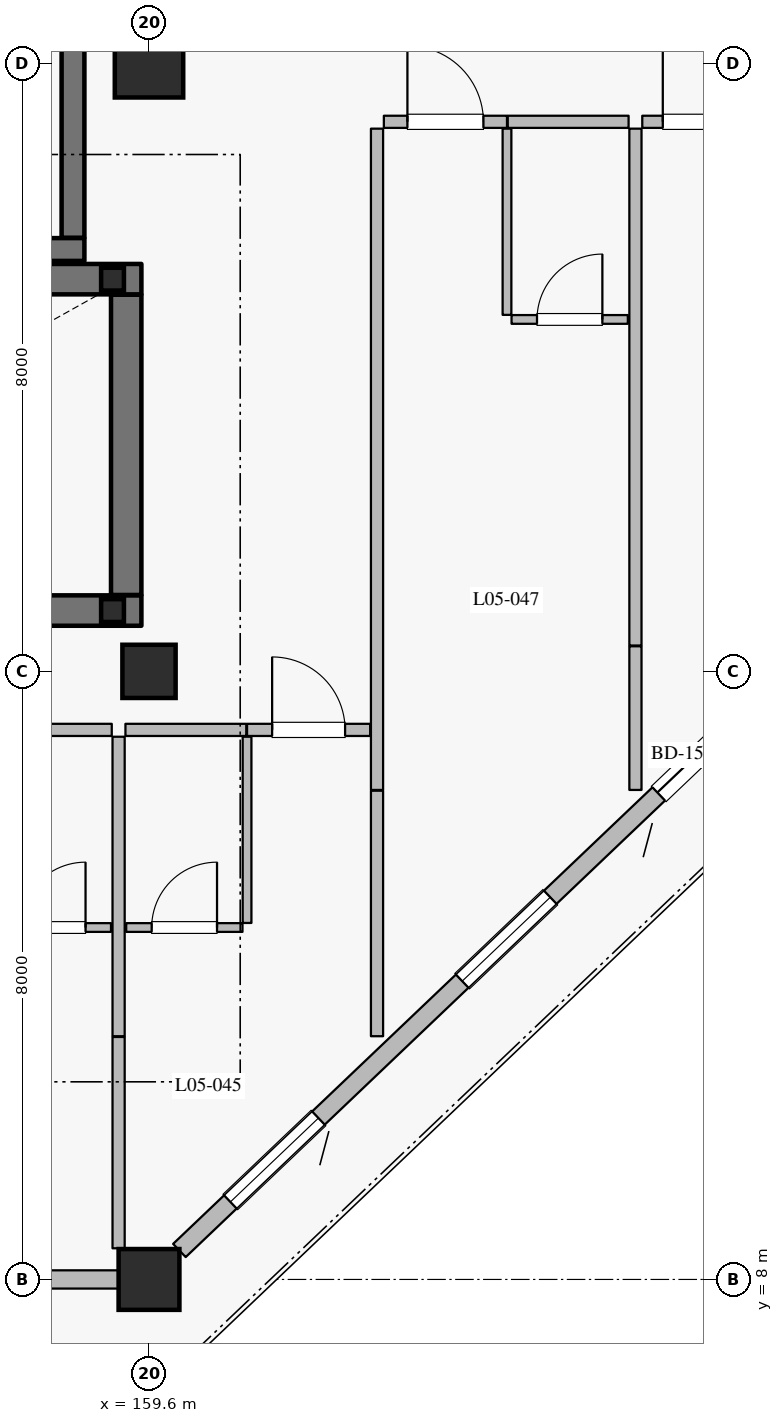
"""IFC4 building model, lengths in metres.
Left out: names, types, materials, properties, quantities, classifications, styles, units other than length and angle.
Written with IfcOpenShell. Run it as: python <this file> out.ifc"""

import sys

from ifc_helpers import new_model, si_unit, direction, frame, frame_2d, origin, origin_2d, place, context, subcontext, project, spatial, rectangle, hollow_rectangle, extrude, element, fill, save


model = new_model("IFC4")
c1 = context("Model", 3, precision=1e-05, world=origin(), true_north=direction((0.0, 1.0)))
c2 = subcontext(c1, "Body", "Model", "MODEL_VIEW")
j1 = project(units=[si_unit("LENGTHUNIT", "METRE"), si_unit("PLANEANGLEUNIT", "RADIAN")], contexts=[c1])
p1 = place(None, origin())
s1 = spatial("IfcSite", under=j1, at=p1, CompositionType="ELEMENT")
p2 = place(p1, origin())
s2 = spatial("IfcBuilding", under=s1, at=p2, CompositionType="ELEMENT")
p3 = place(p2, frame((0.0, 0.0, 25.2)))
s3 = spatial("IfcBuildingStorey", under=s2, at=p3, CompositionType="ELEMENT", Elevation=25.2)
p4 = place(p3, frame((159.6, 8.0, 0.0), z_axis=(0.0, 0.0, 1.0), x_axis=(1.0, 0.0, 0.0)))
e1 = element("IfcColumn", 1, at=p4, inside=s3, PredefinedType="COLUMN", context=c2, shape_type="SweptSolid", body=[
    extrude(rectangle(XDim=0.8, YDim=0.8, at=origin_2d()), origin(), (0.0, 0.0, 1.0), 3.6),
])
p5 = place(p3, frame((159.6, 24.0, 0.0), z_axis=(0.0, 0.0, 1.0), x_axis=(1.0, 0.0, 0.0)))
e2 = element("IfcColumn", 2, at=p5, inside=s3, PredefinedType="COLUMN", context=c2, shape_type="SweptSolid", body=[
    extrude(rectangle(XDim=0.9, YDim=0.9, at=origin_2d()), origin(), (0.0, 0.0, 1.0), 3.6),
])
p6 = place(p3, frame((159.6, 16.0, 0.0), z_axis=(0.0, 0.0, 1.0), x_axis=(1.0, 0.0, 0.0)))
e3 = element("IfcColumn", 3, at=p6, inside=s3, PredefinedType="COLUMN", context=c2, shape_type="SweptSolid", body=[
    extrude(rectangle(XDim=0.7, YDim=0.7, at=origin_2d()), origin(), (0.0, 0.0, 1.0), 3.6),
])
p7 = place(p3, frame((159.2, 8.0, 0.0), z_axis=(0.0, 0.0, 1.0), x_axis=(-1.0, 0.0, 0.0)))
e4 = element("IfcWall", 4, at=p7, inside=s3, PredefinedType="SOLIDWALL", context=c2, shape_type="SweptSolid", body=[
    extrude(rectangle(XDim=7.6, YDim=0.24, at=frame_2d((3.8, 0.0))), origin(), (0.0, 0.0, 1.0), 2.93),
])
p8 = place(p7, frame((0.95, 0.0, 0.0)))
e5 = element("IfcOpeningElement", 5, at=p8, cuts=e4, PredefinedType="OPENING", context=c2, shape_type="SweptSolid", body=[
    extrude(rectangle(XDim=1.5, YDim=2.25, at=frame_2d((0.75, 1.125))), frame((0.0, 0.13, 0.0), z_axis=(0.0, -1.0, 0.0), x_axis=(1.0, 0.0, 0.0)), (0.0, 0.0, 1.0), 0.26),
])
p9 = place(p7, frame((4.3, 0.0, 0.8)))
e6 = element("IfcOpeningElement", 6, at=p9, cuts=e4, PredefinedType="OPENING", context=c2, shape_type="SweptSolid", body=[
    extrude(rectangle(XDim=1.6, YDim=1.6, at=frame_2d((0.8, 0.8))), frame((0.0, 0.13, 0.0), z_axis=(0.0, -1.0, 0.0), x_axis=(1.0, 0.0, 0.0)), (0.0, 0.0, 1.0), 0.26),
])
p10 = place(p3, frame((167.6, 15.619, 0.0), z_axis=(0.0, 0.0, 1.0), x_axis=(-0.724156739794, -0.689635422677, 0.0)))
e7 = element("IfcWall", 7, at=p10, inside=s3, PredefinedType="SOLIDWALL", context=c2, shape_type="SweptSolid", body=[
    extrude(rectangle(XDim=10.495, YDim=0.24, at=frame_2d((5.248, 0.0))), origin(), (0.0, 0.0, 1.0), 2.93),
])
p11 = place(p10, frame((0.286, 0.0, 0.0)))
e8 = element("IfcOpeningElement", 8, at=p11, cuts=e7, PredefinedType="OPENING", context=c2, shape_type="SweptSolid", body=[
    extrude(rectangle(XDim=1.5, YDim=2.25, at=frame_2d((0.75, 1.125))), frame((0.0, 0.13, 0.0), z_axis=(0.0, -1.0, 0.0), x_axis=(1.0, 0.0, 0.0)), (0.0, 0.0, 1.0), 0.26),
])
p12 = place(p10, frame((3.757, 0.0, 0.8)))
e9 = element("IfcOpeningElement", 9, at=p12, cuts=e7, PredefinedType="OPENING", context=c2, shape_type="SweptSolid", body=[
    extrude(rectangle(XDim=1.6, YDim=1.6, at=frame_2d((0.8, 0.8))), frame((0.0, 0.13, 0.0), z_axis=(0.0, -1.0, 0.0), x_axis=(1.0, 0.0, 0.0)), (0.0, 0.0, 1.0), 0.26),
])
p13 = place(p10, frame((7.969, 0.0, 0.8)))
e10 = element("IfcOpeningElement", 10, at=p13, cuts=e7, PredefinedType="OPENING", context=c2, shape_type="SweptSolid", body=[
    extrude(rectangle(XDim=1.6, YDim=1.6, at=frame_2d((0.8, 0.8))), frame((0.0, 0.13, 0.0), z_axis=(0.0, -1.0, 0.0), x_axis=(1.0, 0.0, 0.0)), (0.0, 0.0, 1.0), 0.26),
])
p14 = place(p3, frame((155.25, 21.55, 0.0), z_axis=(0.0, 0.0, 1.0), x_axis=(1.0, 0.0, 0.0)))
e11 = element("IfcWall", 11, at=p14, inside=s3, PredefinedType="SHEAR", context=c2, shape_type="SweptSolid", body=[
    extrude(rectangle(XDim=3.5, YDim=0.3, at=frame_2d((1.75, 0.0))), origin(), (0.0, 0.0, 1.0), 3.335),
])
p15 = place(p3, frame((158.6, 21.705, 0.0), z_axis=(0.0, 0.0, 1.0), x_axis=(0.0, 1.0, 0.0)))
e12 = element("IfcWall", 12, at=p15, inside=s3, PredefinedType="SHEAR", context=c2, shape_type="SweptSolid", body=[
    extrude(rectangle(XDim=2.59, YDim=0.3, at=frame_2d((1.295, 0.0))), origin(), (0.0, 0.0, 1.0), 3.335),
])
p16 = place(p3, frame((151.3, 16.8, 0.0), z_axis=(0.0, 0.0, 1.0), x_axis=(1.0, 0.0, 0.0)))
e13 = element("IfcWall", 13, at=p16, inside=s3, PredefinedType="SHEAR", context=c2, shape_type="SweptSolid", body=[
    extrude(rectangle(XDim=8.2, YDim=0.4, at=frame_2d((4.1, 0.0))), origin(), (0.0, 0.0, 1.0), 3.335),
])
p17 = place(p3, frame((159.3, 17.005, 0.0), z_axis=(0.0, 0.0, 1.0), x_axis=(0.0, 1.0, 0.0)))
e14 = element("IfcWall", 14, at=p17, inside=s3, PredefinedType="SHEAR", context=c2, shape_type="SweptSolid", body=[
    extrude(rectangle(XDim=3.95, YDim=0.4, at=frame_2d((1.975, 0.0))), origin(), (0.0, 0.0, 1.0), 3.335),
])
p18 = place(p3, frame((151.3, 21.16, 0.0), z_axis=(0.0, 0.0, 1.0), x_axis=(1.0, 0.0, 0.0)))
e15 = element("IfcWall", 15, at=p18, inside=s3, PredefinedType="SHEAR", context=c2, shape_type="SweptSolid", body=[
    extrude(rectangle(XDim=8.2, YDim=0.4, at=frame_2d((4.1, 0.0))), origin(), (0.0, 0.0, 1.0), 3.335),
])
p19 = place(p18, frame((0.43, 0.0, 0.0)))
e16 = element("IfcOpeningElement", 16, at=p19, cuts=e15, PredefinedType="OPENING", context=c2, shape_type="SweptSolid", body=[
    extrude(rectangle(XDim=1.16, YDim=2.2, at=frame_2d((0.58, 1.1))), frame((0.0, 0.21, 0.0), z_axis=(0.0, -1.0, 0.0), x_axis=(1.0, 0.0, 0.0)), (0.0, 0.0, 1.0), 0.42),
])
for number, where, z_axis, x_axis in (
    (17, (159.12, 16.8, -2.1), (0.0, 0.0, 1.0), (1.0, 0.0, 0.0)),
    (18, (159.12, 21.16, -2.1), (0.0, 0.0, 1.0), (1.0, 0.0, 0.0)),
):
    element("IfcColumn", number, at=place(p3, frame(where, z_axis=z_axis, x_axis=x_axis)), inside=s3, PredefinedType="COLUMN", context=c2, shape_type="SweptSolid", body=[
        extrude(hollow_rectangle(XDim=0.3, YDim=0.3, WallThickness=0.012, at=origin_2d()), origin(), (0.0, 0.0, 1.0), 3.72),
    ])
p20 = place(p3, frame((157.52, 15.23, 0.0), z_axis=(0.0, 0.0, 1.0), x_axis=(1.0, 0.0, 0.0)))
e19 = element("IfcWall", 19, at=p20, inside=s3, PredefinedType="PARTITIONING", context=c2, shape_type="SweptSolid", body=[
    extrude(rectangle(XDim=1.59, YDim=0.16, at=frame_2d((0.795, 0.0))), origin(), (0.0, 0.0, 1.0), 3.335),
])
p21 = place(p3, frame((157.57, 12.63, 0.0), z_axis=(0.0, 0.0, 1.0), x_axis=(1.0, 0.0, 0.0)))
e20 = element("IfcWall", 20, at=p21, inside=s3, PredefinedType="PARTITIONING", context=c2, shape_type="SweptSolid", body=[
    extrude(rectangle(XDim=1.53, YDim=0.115, at=frame_2d((0.765, 0.0))), origin(), (0.0, 0.0, 1.0), 3.335),
])
p22 = place(p21, frame((0.335, 0.0, 0.0)))
e21 = element("IfcOpeningElement", 21, at=p22, cuts=e20, PredefinedType="OPENING", context=c2, shape_type="SweptSolid", body=[
    extrude(rectangle(XDim=0.86, YDim=2.12, at=frame_2d((0.43, 1.06))), frame((0.0, 0.067, 0.0), z_axis=(0.0, -1.0, 0.0), x_axis=(1.0, 0.0, 0.0)), (0.0, 0.0, 1.0), 0.135),
])
p23 = place(p3, frame((159.2, 8.41, 0.0), z_axis=(0.0, 0.0, 1.0), x_axis=(0.0, 1.0, 0.0)))
e22 = element("IfcWall", 22, at=p23, inside=s3, PredefinedType="PARTITIONING", context=c2, shape_type="SweptSolid", body=[
    extrude(rectangle(XDim=2.78, YDim=0.16, at=frame_2d((1.39, 0.0))), origin(), (0.0, 0.0, 1.0), 3.335),
])
p24 = place(p3, frame((159.29, 15.23, 0.0), z_axis=(0.0, 0.0, 1.0), x_axis=(1.0, 0.0, 0.0)))
e23 = element("IfcWall", 23, at=p24, inside=s3, PredefinedType="PARTITIONING", context=c2, shape_type="SweptSolid", body=[
    extrude(rectangle(XDim=1.59, YDim=0.16, at=frame_2d((0.795, 0.0))), origin(), (0.0, 0.0, 1.0), 3.335),
])
p25 = place(p3, frame((160.89, 15.23, 0.0), z_axis=(0.0, 0.0, 1.0), x_axis=(1.0, 0.0, 0.0)))
e24 = element("IfcWall", 24, at=p25, inside=s3, PredefinedType="PARTITIONING", context=c2, shape_type="SweptSolid", body=[
    extrude(rectangle(XDim=1.62, YDim=0.16, at=frame_2d((0.81, 0.0))), origin(), (0.0, 0.0, 1.0), 3.335),
])
p26 = place(p25, frame((0.33, 0.0, 0.0)))
e25 = element("IfcOpeningElement", 25, at=p26, cuts=e24, PredefinedType="OPENING", context=c2, shape_type="SweptSolid", body=[
    extrude(rectangle(XDim=0.96, YDim=2.2, at=frame_2d((0.48, 1.1))), frame((0.0, 0.09, 0.0), z_axis=(0.0, -1.0, 0.0), x_axis=(1.0, 0.0, 0.0)), (0.0, 0.0, 1.0), 0.18),
])
p27 = place(p3, frame((160.89, 12.69, 0.0), z_axis=(0.0, 0.0, 1.0), x_axis=(0.0, 1.0, 0.0)))
e26 = element("IfcWall", 26, at=p27, inside=s3, PredefinedType="PARTITIONING", context=c2, shape_type="SweptSolid", body=[
    extrude(rectangle(XDim=2.45, YDim=0.115, at=frame_2d((1.225, 0.0))), origin(), (0.0, 0.0, 1.0), 3.335),
])
p28 = place(p3, frame((159.3, 12.63, 0.0), z_axis=(0.0, 0.0, 1.0), x_axis=(1.0, 0.0, 0.0)))
e27 = element("IfcWall", 27, at=p28, inside=s3, PredefinedType="PARTITIONING", context=c2, shape_type="SweptSolid", body=[
    extrude(rectangle(XDim=1.53, YDim=0.115, at=frame_2d((0.765, 0.0))), origin(), (0.0, 0.0, 1.0), 3.335),
])
p29 = place(p28, frame((0.335, 0.0, 0.0)))
e28 = element("IfcOpeningElement", 28, at=p29, cuts=e27, PredefinedType="OPENING", context=c2, shape_type="SweptSolid", body=[
    extrude(rectangle(XDim=0.86, YDim=2.12, at=frame_2d((0.43, 1.06))), frame((0.0, 0.067, 0.0), z_axis=(0.0, -1.0, 0.0), x_axis=(1.0, 0.0, 0.0)), (0.0, 0.0, 1.0), 0.135),
])
p30 = place(p3, frame((159.2, 11.2, 0.0), z_axis=(0.0, 0.0, 1.0), x_axis=(0.0, 1.0, 0.0)))
e29 = element("IfcWall", 29, at=p30, inside=s3, PredefinedType="PARTITIONING", context=c2, shape_type="SweptSolid", body=[
    extrude(rectangle(XDim=3.94, YDim=0.16, at=frame_2d((1.97, 0.0))), origin(), (0.0, 0.0, 1.0), 3.335),
])
p31 = place(p3, frame((162.6, 11.2, 0.0), z_axis=(0.0, 0.0, 1.0), x_axis=(0.0, 1.0, 0.0)))
e30 = element("IfcWall", 30, at=p31, inside=s3, PredefinedType="PARTITIONING", context=c2, shape_type="SweptSolid", body=[
    extrude(rectangle(XDim=3.23, YDim=0.16, at=frame_2d((1.615, 0.0))), origin(), (0.0, 0.0, 1.0), 3.335),
])
p32 = place(p3, frame((162.69, 23.23, 0.0), z_axis=(0.0, 0.0, 1.0), x_axis=(1.0, 0.0, 0.0)))
e31 = element("IfcWall", 31, at=p32, inside=s3, PredefinedType="PARTITIONING", context=c2, shape_type="SweptSolid", body=[
    extrude(rectangle(XDim=1.62, YDim=0.16, at=frame_2d((0.81, 0.0))), origin(), (0.0, 0.0, 1.0), 3.335),
])
p33 = place(p32, frame((0.31, 0.0, 0.0)))
e32 = element("IfcOpeningElement", 32, at=p33, cuts=e31, PredefinedType="OPENING", context=c2, shape_type="SweptSolid", body=[
    extrude(rectangle(XDim=1.0, YDim=2.25, at=frame_2d((0.5, 1.125))), frame((0.0, 0.09, 0.0), z_axis=(0.0, -1.0, 0.0), x_axis=(1.0, 0.0, 0.0)), (0.0, 0.0, 1.0), 0.18),
])
p34 = place(p3, frame((164.32, 23.23, 0.0), z_axis=(0.0, 0.0, 1.0), x_axis=(1.0, 0.0, 0.0)))
e33 = element("IfcWall", 33, at=p34, inside=s3, PredefinedType="PARTITIONING", context=c2, shape_type="SweptSolid", body=[
    extrude(rectangle(XDim=1.59, YDim=0.16, at=frame_2d((0.795, 0.0))), origin(), (0.0, 0.0, 1.0), 3.335),
])
p35 = place(p3, frame((164.31, 20.69, 0.0), z_axis=(0.0, 0.0, 1.0), x_axis=(0.0, 1.0, 0.0)))
e34 = element("IfcWall", 34, at=p35, inside=s3, PredefinedType="PARTITIONING", context=c2, shape_type="SweptSolid", body=[
    extrude(rectangle(XDim=2.45, YDim=0.115, at=frame_2d((1.225, 0.0))), origin(), (0.0, 0.0, 1.0), 3.335),
])
p36 = place(p3, frame((164.37, 20.63, 0.0), z_axis=(0.0, 0.0, 1.0), x_axis=(1.0, 0.0, 0.0)))
e35 = element("IfcWall", 35, at=p36, inside=s3, PredefinedType="PARTITIONING", context=c2, shape_type="SweptSolid", body=[
    extrude(rectangle(XDim=1.53, YDim=0.115, at=frame_2d((0.765, 0.0))), origin(), (0.0, 0.0, 1.0), 3.335),
])
p37 = place(p36, frame((0.335, 0.0, 0.0)))
e36 = element("IfcOpeningElement", 36, at=p37, cuts=e35, PredefinedType="OPENING", context=c2, shape_type="SweptSolid", body=[
    extrude(rectangle(XDim=0.86, YDim=2.12, at=frame_2d((0.43, 1.06))), frame((0.0, 0.067, 0.0), z_axis=(0.0, -1.0, 0.0), x_axis=(1.0, 0.0, 0.0)), (0.0, 0.0, 1.0), 0.135),
])
p38 = place(p3, frame((162.6, 14.44, 0.0), z_axis=(0.0, 0.0, 1.0), x_axis=(0.0, 1.0, 0.0)))
e37 = element("IfcWall", 37, at=p38, inside=s3, PredefinedType="PARTITIONING", context=c2, shape_type="SweptSolid", body=[
    extrude(rectangle(XDim=8.7, YDim=0.16, at=frame_2d((4.35, 0.0))), origin(), (0.0, 0.0, 1.0), 3.335),
])
p39 = place(p3, frame((166.0, 14.44, 0.0), z_axis=(0.0, 0.0, 1.0), x_axis=(0.0, 1.0, 0.0)))
e38 = element("IfcWall", 38, at=p39, inside=s3, PredefinedType="PARTITIONING", context=c2, shape_type="SweptSolid", body=[
    extrude(rectangle(XDim=1.89, YDim=0.16, at=frame_2d((0.945, 0.0))), origin(), (0.0, 0.0, 1.0), 3.335),
])
p40 = place(p3, frame((166.09, 23.23, 0.0), z_axis=(0.0, 0.0, 1.0), x_axis=(1.0, 0.0, 0.0)))
e39 = element("IfcWall", 39, at=p40, inside=s3, PredefinedType="PARTITIONING", context=c2, shape_type="SweptSolid", body=[
    extrude(rectangle(XDim=1.62, YDim=0.16, at=frame_2d((0.81, 0.0))), origin(), (0.0, 0.0, 1.0), 3.335),
])
p41 = place(p40, frame((0.27, 0.0, 0.0)))
e40 = element("IfcOpeningElement", 40, at=p41, cuts=e39, PredefinedType="OPENING", context=c2, shape_type="SweptSolid", body=[
    extrude(rectangle(XDim=1.08, YDim=2.3, at=frame_2d((0.54, 1.15))), frame((0.0, 0.09, 0.0), z_axis=(0.0, -1.0, 0.0), x_axis=(1.0, 0.0, 0.0)), (0.0, 0.0, 1.0), 0.18),
])
p42 = place(p3, frame((166.0, 16.34, 0.0), z_axis=(0.0, 0.0, 1.0), x_axis=(0.0, 1.0, 0.0)))
e41 = element("IfcWall", 41, at=p42, inside=s3, PredefinedType="PARTITIONING", context=c2, shape_type="SweptSolid", body=[
    extrude(rectangle(XDim=6.8, YDim=0.16, at=frame_2d((3.4, 0.0))), origin(), (0.0, 0.0, 1.0), 3.335),
])
p43 = place(p11, origin())
e42 = element("IfcDoor", 42, at=p43, inside=s3, OperationType="SLIDING_TO_LEFT", PredefinedType="DOOR", context=c2, shape_type="SweptSolid", body=[
    extrude(rectangle(XDim=1.5, YDim=2.25, at=frame_2d((0.75, 1.125))), frame((0.0, 0.025, 0.0), z_axis=(0.0, -1.0, 0.0), x_axis=(1.0, 0.0, 0.0)), (0.0, 0.0, 1.0), 0.05),
])
fill(e8, e42)
p44 = place(p12, origin())
e43 = element("IfcWindow", 43, at=p44, inside=s3, PartitioningType="SINGLE_PANEL", PredefinedType="WINDOW", context=c2, shape_type="SweptSolid", body=[
    extrude(rectangle(XDim=1.6, YDim=1.6, at=frame_2d((0.8, 0.8))), frame((0.0, 0.03, 0.0), z_axis=(0.0, -1.0, 0.0), x_axis=(1.0, 0.0, 0.0)), (0.0, 0.0, 1.0), 0.06),
])
fill(e9, e43)
p45 = place(p13, origin())
e44 = element("IfcWindow", 44, at=p45, inside=s3, PartitioningType="SINGLE_PANEL", PredefinedType="WINDOW", context=c2, shape_type="SweptSolid", body=[
    extrude(rectangle(XDim=1.6, YDim=1.6, at=frame_2d((0.8, 0.8))), frame((0.0, 0.03, 0.0), z_axis=(0.0, -1.0, 0.0), x_axis=(1.0, 0.0, 0.0)), (0.0, 0.0, 1.0), 0.06),
])
fill(e10, e44)
p46 = place(p22, origin())
e45 = element("IfcDoor", 45, at=p46, inside=s3, OperationType="SINGLE_SWING_RIGHT", PredefinedType="DOOR", context=c2, shape_type="SweptSolid", body=[
    extrude(rectangle(XDim=0.86, YDim=2.12, at=frame_2d((0.43, 1.06))), frame((0.0, 0.025, 0.0), z_axis=(0.0, -1.0, 0.0), x_axis=(1.0, 0.0, 0.0)), (0.0, 0.0, 1.0), 0.05),
])
fill(e21, e45)
p47 = place(p26, origin())
e46 = element("IfcDoor", 46, at=p47, inside=s3, OperationType="SINGLE_SWING_LEFT", PredefinedType="DOOR", context=c2, shape_type="SweptSolid", body=[
    extrude(rectangle(XDim=0.96, YDim=2.2, at=frame_2d((0.48, 1.1))), frame((0.0, 0.025, 0.0), z_axis=(0.0, -1.0, 0.0), x_axis=(1.0, 0.0, 0.0)), (0.0, 0.0, 1.0), 0.05),
])
fill(e25, e46)
p48 = place(p29, origin())
e47 = element("IfcDoor", 47, at=p48, inside=s3, OperationType="SINGLE_SWING_RIGHT", PredefinedType="DOOR", context=c2, shape_type="SweptSolid", body=[
    extrude(rectangle(XDim=0.86, YDim=2.12, at=frame_2d((0.43, 1.06))), frame((0.0, 0.025, 0.0), z_axis=(0.0, -1.0, 0.0), x_axis=(1.0, 0.0, 0.0)), (0.0, 0.0, 1.0), 0.05),
])
fill(e28, e47)
p49 = place(p33, origin())
e48 = element("IfcDoor", 48, at=p49, inside=s3, OperationType="SINGLE_SWING_LEFT", PredefinedType="DOOR", context=c2, shape_type="SweptSolid", body=[
    extrude(rectangle(XDim=1.0, YDim=2.25, at=frame_2d((0.5, 1.125))), frame((0.0, 0.025, 0.0), z_axis=(0.0, -1.0, 0.0), x_axis=(1.0, 0.0, 0.0)), (0.0, 0.0, 1.0), 0.05),
])
fill(e32, e48)
p50 = place(p37, origin())
e49 = element("IfcDoor", 49, at=p50, inside=s3, OperationType="SINGLE_SWING_RIGHT", PredefinedType="DOOR", context=c2, shape_type="SweptSolid", body=[
    extrude(rectangle(XDim=0.86, YDim=2.12, at=frame_2d((0.43, 1.06))), frame((0.0, 0.025, 0.0), z_axis=(0.0, -1.0, 0.0), x_axis=(1.0, 0.0, 0.0)), (0.0, 0.0, 1.0), 0.05),
])
fill(e36, e49)
p51 = place(p41, origin())
e50 = element("IfcDoor", 50, at=p51, inside=s3, OperationType="SINGLE_SWING_LEFT", PredefinedType="DOOR", context=c2, shape_type="SweptSolid", body=[
    extrude(rectangle(XDim=1.08, YDim=2.3, at=frame_2d((0.54, 1.15))), frame((0.0, 0.025, 0.0), z_axis=(0.0, -1.0, 0.0), x_axis=(1.0, 0.0, 0.0)), (0.0, 0.0, 1.0), 0.05),
])
fill(e40, e50)
save(model, sys.argv[1])
